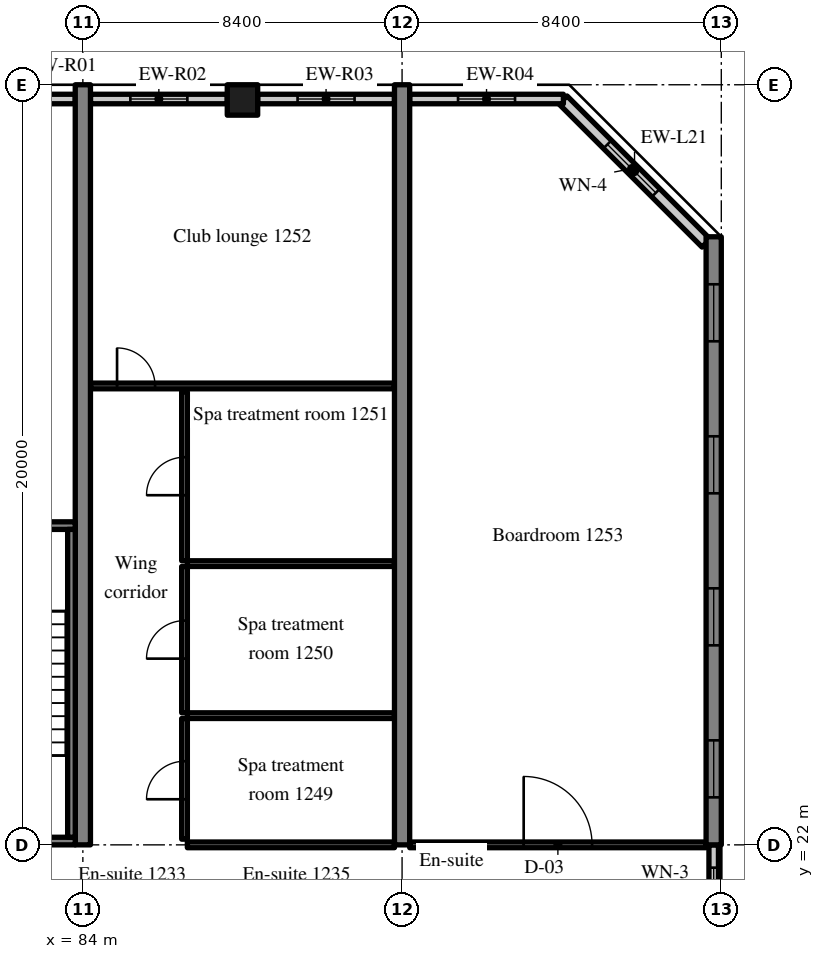
"""IFC4 building model, lengths in metres.
Left out: names, types, materials, properties, quantities, classifications, styles, units other than length and angle.
Written with IfcOpenShell. Run it as: python <this file> out.ifc"""

import sys

from ifc_helpers import new_model, si_unit, direction, frame, frame_2d, origin, origin_2d, place, context, subcontext, project, spatial, rectangle, extrude, source, transform, mapped, element, fill, save


model = new_model("IFC4")
c1 = context("Model", 3, precision=1e-05, world=origin(), true_north=direction((0.0, 1.0)))
c2 = subcontext(c1, "Body", "Model", "MODEL_VIEW")
j1 = project(units=[si_unit("LENGTHUNIT", "METRE"), si_unit("PLANEANGLEUNIT", "RADIAN")], contexts=[c1])
p1 = place(None, origin())
s1 = spatial("IfcSite", under=j1, at=p1, CompositionType="ELEMENT")
p2 = place(p1, origin())
s2 = spatial("IfcBuilding", under=s1, at=p2, CompositionType="ELEMENT")
p3 = place(p2, frame((0.0, 0.0, 54.4)))
s3 = spatial("IfcBuildingStorey", under=s2, at=p3, CompositionType="ELEMENT", Elevation=54.4)
m1 = source(origin(), c2, "Body", "SweptSolid", [
    extrude(rectangle(XDim=20.0, YDim=0.4, at=frame_2d((10.0, 0.0))), origin(), (0.0, 0.0, 1.0), 3.52),
])
for number, where, z_axis, x_axis in (
    (1, (84.0, 22.0, 0.0), (0.0, 0.0, 1.0), (0.0, 1.0, 0.0)),
    (2, (92.4, 22.0, 0.0), (0.0, 0.0, 1.0), (0.0, 1.0, 0.0)),
):
    element("IfcWall", number, at=place(p3, frame(where, z_axis=z_axis, x_axis=x_axis)), inside=s3, PredefinedType="SHEAR", context=c2, shape_type="MappedRepresentation", body=[
        mapped(m1, transform((0.0, 0.0, 0.0), scale=1.0)),
    ])
m2 = source(origin(), c2, "Body", "SweptSolid", [
    extrude(rectangle(XDim=16.0, YDim=0.4, at=frame_2d((8.0, 0.0))), origin(), (0.0, 0.0, 1.0), 3.52),
])
p4 = place(p3, frame((100.6, 22.0, 0.0), z_axis=(0.0, 0.0, 1.0), x_axis=(0.0, 1.0, 0.0)))
e3 = element("IfcWall", 3, at=p4, inside=s3, PredefinedType="SHEAR", context=c2, shape_type="MappedRepresentation", body=[
    mapped(m2, transform((0.0, 0.0, 0.0), scale=1.0)),
])
m3 = source(origin(), c2, "Body", "SweptSolid", [
    extrude(rectangle(XDim=1.5, YDim=1.5, at=frame_2d((0.75, 0.75))), frame((0.0, 0.21, 0.0), z_axis=(0.0, -1.0, 0.0), x_axis=(1.0, 0.0, 0.0)), (0.0, 0.0, 1.0), 0.42),
])
p5 = place(p4, frame((1.25, 0.0, 0.9)))
e4 = element("IfcOpeningElement", 4, at=p5, cuts=e3, PredefinedType="OPENING", context=c2, shape_type="MappedRepresentation", body=[
    mapped(m3, transform((0.0, 0.0, 0.0), scale=1.0)),
])
p6 = place(p4, frame((5.25, 0.0, 0.9)))
e5 = element("IfcOpeningElement", 5, at=p6, cuts=e3, PredefinedType="OPENING", context=c2, shape_type="MappedRepresentation", body=[
    mapped(m3, transform((0.0, 0.0, 0.0), scale=1.0)),
])
p7 = place(p4, frame((9.25, 0.0, 0.9)))
e6 = element("IfcOpeningElement", 6, at=p7, cuts=e3, PredefinedType="OPENING", context=c2, shape_type="MappedRepresentation", body=[
    mapped(m3, transform((0.0, 0.0, 0.0), scale=1.0)),
])
p8 = place(p4, frame((13.25, 0.0, 0.9)))
e7 = element("IfcOpeningElement", 7, at=p8, cuts=e3, PredefinedType="OPENING", context=c2, shape_type="MappedRepresentation", body=[
    mapped(m3, transform((0.0, 0.0, 0.0), scale=1.0)),
])
m4 = source(origin(), c2, "Body", "SweptSolid", [
    extrude(rectangle(XDim=0.8, YDim=0.8, at=origin_2d()), origin(), (0.0, 0.0, 1.0), 3.52),
])
p9 = place(p3, frame((88.2, 41.6, 0.0), z_axis=(0.0, 0.0, 1.0), x_axis=(1.0, 0.0, 0.0)))
e8 = element("IfcColumn", 8, at=p9, inside=s3, PredefinedType="COLUMN", context=c2, shape_type="MappedRepresentation", body=[
    mapped(m4, transform((0.0, 0.0, 0.0), scale=1.0)),
])
m5 = source(origin(), c2, "Body", "SweptSolid", [
    extrude(rectangle(XDim=5.326, YDim=0.3, at=frame_2d((2.663, 0.0))), origin(), (0.0, 0.0, 1.0), 3.52),
])
p10 = place(p3, frame((100.4, 37.834, 0.0), z_axis=(0.0, 0.0, 1.0), x_axis=(-0.707083859269, 0.707129702361, 0.0)))
e9 = element("IfcWall", 9, at=p10, inside=s3, PredefinedType="SOLIDWALL", context=c2, shape_type="MappedRepresentation", body=[
    mapped(m5, transform((0.0, 0.0, 0.0), scale=1.0)),
])
m6 = source(origin(), c2, "Body", "SweptSolid", [
    extrude(rectangle(XDim=1.8, YDim=1.5, at=frame_2d((0.9, 0.75))), frame((0.0, 0.16, 0.0), z_axis=(0.0, -1.0, 0.0), x_axis=(1.0, 0.0, 0.0)), (0.0, 0.0, 1.0), 0.32),
])
p11 = place(p10, frame((1.871, 0.0, 0.9)))
e10 = element("IfcOpeningElement", 10, at=p11, cuts=e9, PredefinedType="OPENING", context=c2, shape_type="MappedRepresentation", body=[
    mapped(m6, transform((0.0, 0.0, 0.0), scale=1.0)),
])
m7 = source(origin(), c2, "Body", "SweptSolid", [
    extrude(rectangle(XDim=1.658, YDim=0.25, at=frame_2d((0.829, 0.0))), origin(), (0.0, 0.0, 1.0), 2.82),
])
p12 = place(p3, frame((83.8, 41.625, 0.0), z_axis=(0.0, 0.0, 1.0), x_axis=(-1.0, 0.0, 0.0)))
e11 = element("IfcWall", 11, at=p12, inside=s3, PredefinedType="SOLIDWALL", context=c2, shape_type="MappedRepresentation", body=[
    mapped(m7, transform((0.0, 0.0, 0.0), scale=1.0)),
])
m8 = source(origin(), c2, "Body", "SweptSolid", [
    extrude(rectangle(XDim=3.6, YDim=0.25, at=frame_2d((1.8, 0.0))), origin(), (0.0, 0.0, 1.0), 2.82),
])
p13 = place(p3, frame((87.8, 41.625, 0.0), z_axis=(0.0, 0.0, 1.0), x_axis=(-1.0, 0.0, 0.0)))
e12 = element("IfcWall", 12, at=p13, inside=s3, PredefinedType="SOLIDWALL", context=c2, shape_type="MappedRepresentation", body=[
    mapped(m8, transform((0.0, 0.0, 0.0), scale=1.0)),
])
m9 = source(origin(), c2, "Body", "SweptSolid", [
    extrude(rectangle(XDim=1.5, YDim=1.5, at=frame_2d((0.75, 0.75))), frame((0.0, 0.135, 0.0), z_axis=(0.0, -1.0, 0.0), x_axis=(1.0, 0.0, 0.0)), (0.0, 0.0, 1.0), 0.27),
])
p14 = place(p13, frame((1.05, 0.0, 0.9)))
e13 = element("IfcOpeningElement", 13, at=p14, cuts=e12, PredefinedType="OPENING", context=c2, shape_type="MappedRepresentation", body=[
    mapped(m9, transform((0.0, 0.0, 0.0), scale=1.0)),
])
m10 = source(origin(), c2, "Body", "SweptSolid", [
    extrude(rectangle(XDim=3.6, YDim=0.25, at=frame_2d((1.8, 0.0))), origin(), (0.0, 0.0, 1.0), 2.82),
])
p15 = place(p3, frame((92.2, 41.625, 0.0), z_axis=(0.0, 0.0, 1.0), x_axis=(-1.0, 0.0, 0.0)))
e14 = element("IfcWall", 14, at=p15, inside=s3, PredefinedType="SOLIDWALL", context=c2, shape_type="MappedRepresentation", body=[
    mapped(m10, transform((0.0, 0.0, 0.0), scale=1.0)),
])
p16 = place(p15, frame((1.05, 0.0, 0.9)))
e15 = element("IfcOpeningElement", 15, at=p16, cuts=e14, PredefinedType="OPENING", context=c2, shape_type="MappedRepresentation", body=[
    mapped(m9, transform((0.0, 0.0, 0.0), scale=1.0)),
])
m11 = source(origin(), c2, "Body", "SweptSolid", [
    extrude(rectangle(XDim=4.045, YDim=0.25, at=frame_2d((2.022, 0.0))), origin(), (0.0, 0.0, 1.0), 2.82),
])
p17 = place(p3, frame((96.645, 41.625, 0.0), z_axis=(0.0, 0.0, 1.0), x_axis=(-1.0, 0.0, 0.0)))
e16 = element("IfcWall", 16, at=p17, inside=s3, PredefinedType="SOLIDWALL", context=c2, shape_type="MappedRepresentation", body=[
    mapped(m11, transform((0.0, 0.0, 0.0), scale=1.0)),
])
p18 = place(p17, frame((1.272, 0.0, 0.9)))
e17 = element("IfcOpeningElement", 17, at=p18, cuts=e16, PredefinedType="OPENING", context=c2, shape_type="MappedRepresentation", body=[
    mapped(m9, transform((0.0, 0.0, 0.0), scale=1.0)),
])
m12 = source(origin(), c2, "Body", "SweptSolid", [
    extrude(rectangle(XDim=2.4, YDim=0.25, at=frame_2d((1.2, 0.0))), origin(), (0.0, 0.0, 1.0), 2.62),
])
p19 = place(p3, frame((100.6, 19.6, 0.0), z_axis=(0.0, 0.0, 1.0), x_axis=(0.0, 1.0, 0.0)))
e18 = element("IfcWall", 18, at=p19, inside=s3, PredefinedType="SOLIDWALL", context=c2, shape_type="MappedRepresentation", body=[
    mapped(m12, transform((0.0, 0.0, 0.0), scale=1.0)),
])
m13 = source(origin(), c2, "Body", "SweptSolid", [
    extrude(rectangle(XDim=1.2, YDim=1.5, at=frame_2d((0.6, 0.75))), frame((0.0, 0.135, 0.0), z_axis=(0.0, -1.0, 0.0), x_axis=(1.0, 0.0, 0.0)), (0.0, 0.0, 1.0), 0.27),
])
p20 = place(p19, frame((0.6, 0.0, 0.9)))
e19 = element("IfcOpeningElement", 19, at=p20, cuts=e18, PredefinedType="OPENING", context=c2, shape_type="MappedRepresentation", body=[
    mapped(m13, transform((0.0, 0.0, 0.0), scale=1.0)),
])
m14 = source(origin(), c2, "Body", "SweptSolid", [
    extrude(rectangle(XDim=8.2, YDim=0.2, at=frame_2d((4.1, 0.0))), origin(), (0.0, 0.0, 1.0), 3.52),
])
p21 = place(p3, frame((83.8, 22.1, 0.0), z_axis=(0.0, 0.0, 1.0), x_axis=(-1.0, 0.0, 0.0)))
e20 = element("IfcWall", 20, at=p21, inside=s3, PredefinedType="SOLIDWALL", context=c2, shape_type="MappedRepresentation", body=[
    mapped(m14, transform((0.0, 0.0, 0.0), scale=1.0)),
])
m15 = source(origin(), c2, "Body", "SweptSolid", [
    extrude(rectangle(XDim=1.2, YDim=2.1, at=frame_2d((0.6, 1.05))), frame((0.0, 0.11, 0.0), z_axis=(0.0, -1.0, 0.0), x_axis=(1.0, 0.0, 0.0)), (0.0, 0.0, 1.0), 0.22),
])
p22 = place(p21, frame((6.0, 0.0, 0.0)))
e21 = element("IfcOpeningElement", 21, at=p22, cuts=e20, PredefinedType="OPENING", context=c2, shape_type="MappedRepresentation", body=[
    mapped(m15, transform((0.0, 0.0, 0.0), scale=1.0)),
])
p23 = place(p3, frame((83.8, 30.4, 0.0), z_axis=(0.0, 0.0, 1.0), x_axis=(-1.0, 0.0, 0.0)))
e22 = element("IfcWall", 22, at=p23, inside=s3, PredefinedType="SOLIDWALL", context=c2, shape_type="MappedRepresentation", body=[
    mapped(m14, transform((0.0, 0.0, 0.0), scale=1.0)),
])
m16 = source(origin(), c2, "Body", "SweptSolid", [
    extrude(rectangle(XDim=1.0, YDim=2.1, at=frame_2d((0.5, 1.05))), frame((0.0, 0.11, 0.0), z_axis=(0.0, -1.0, 0.0), x_axis=(1.0, 0.0, 0.0)), (0.0, 0.0, 1.0), 0.22),
])
p24 = place(p23, frame((6.1, 0.0, 0.0)))
e23 = element("IfcOpeningElement", 23, at=p24, cuts=e22, PredefinedType="OPENING", context=c2, shape_type="MappedRepresentation", body=[
    mapped(m16, transform((0.0, 0.0, 0.0), scale=1.0)),
])
m17 = source(origin(), c2, "Body", "SweptSolid", [
    extrude(rectangle(XDim=8.1, YDim=0.2, at=frame_2d((4.05, 0.0))), origin(), (0.0, 0.0, 1.0), 3.52),
])
p25 = place(p3, frame((83.7, 22.2, 0.0), z_axis=(0.0, 0.0, 1.0), x_axis=(0.0, 1.0, 0.0)))
e24 = element("IfcWall", 24, at=p25, inside=s3, PredefinedType="SOLIDWALL", context=c2, shape_type="MappedRepresentation", body=[
    mapped(m17, transform((0.0, 0.0, 0.0), scale=1.0)),
])
m18 = source(origin(), c2, "Body", "SweptSolid", [
    extrude(rectangle(XDim=5.45, YDim=0.15, at=frame_2d((2.725, 0.0))), origin(), (0.0, 0.0, 1.0), 2.82),
])
p26 = place(p3, frame((86.75, 22.0, 0.0), z_axis=(0.0, 0.0, 1.0), x_axis=(1.0, 0.0, 0.0)))
e25 = element("IfcWall", 25, at=p26, inside=s3, PredefinedType="PARTITIONING", context=c2, shape_type="MappedRepresentation", body=[
    mapped(m18, transform((0.0, 0.0, 0.0), scale=1.0)),
])
m19 = source(origin(), c2, "Body", "SweptSolid", [
    extrude(rectangle(XDim=3.175, YDim=0.15, at=frame_2d((1.587, 0.0))), origin(), (0.0, 0.0, 1.0), 3.52),
])
p27 = place(p3, frame((86.675, 22.15, 0.0), z_axis=(0.0, 0.0, 1.0), x_axis=(0.0, 1.0, 0.0)))
e26 = element("IfcWall", 26, at=p27, inside=s3, PredefinedType="PARTITIONING", context=c2, shape_type="MappedRepresentation", body=[
    mapped(m19, transform((0.0, 0.0, 0.0), scale=1.0)),
])
m20 = source(origin(), c2, "Body", "SweptSolid", [
    extrude(rectangle(XDim=1.0, YDim=2.1, at=frame_2d((0.5, 1.05))), frame((0.0, 0.085, 0.0), z_axis=(0.0, -1.0, 0.0), x_axis=(1.0, 0.0, 0.0)), (0.0, 0.0, 1.0), 0.17),
])
p28 = place(p27, frame((1.05, 0.0, 0.0)))
e27 = element("IfcOpeningElement", 27, at=p28, cuts=e26, PredefinedType="OPENING", context=c2, shape_type="MappedRepresentation", body=[
    mapped(m20, transform((0.0, 0.0, 0.0), scale=1.0)),
])
m21 = source(origin(), c2, "Body", "SweptSolid", [
    extrude(rectangle(XDim=5.45, YDim=0.15, at=frame_2d((2.725, 0.0))), origin(), (0.0, 0.0, 1.0), 3.52),
])
p29 = place(p3, frame((86.75, 25.4, 0.0), z_axis=(0.0, 0.0, 1.0), x_axis=(1.0, 0.0, 0.0)))
e28 = element("IfcWall", 28, at=p29, inside=s3, PredefinedType="PARTITIONING", context=c2, shape_type="MappedRepresentation", body=[
    mapped(m21, transform((0.0, 0.0, 0.0), scale=1.0)),
])
m22 = source(origin(), c2, "Body", "SweptSolid", [
    extrude(rectangle(XDim=3.85, YDim=0.15, at=frame_2d((1.925, 0.0))), origin(), (0.0, 0.0, 1.0), 3.52),
])
p30 = place(p3, frame((86.675, 25.475, 0.0), z_axis=(0.0, 0.0, 1.0), x_axis=(0.0, 1.0, 0.0)))
e29 = element("IfcWall", 29, at=p30, inside=s3, PredefinedType="PARTITIONING", context=c2, shape_type="MappedRepresentation", body=[
    mapped(m22, transform((0.0, 0.0, 0.0), scale=1.0)),
])
p31 = place(p30, frame((1.425, 0.0, 0.0)))
e30 = element("IfcOpeningElement", 30, at=p31, cuts=e29, PredefinedType="OPENING", context=c2, shape_type="MappedRepresentation", body=[
    mapped(m20, transform((0.0, 0.0, 0.0), scale=1.0)),
])
p32 = place(p3, frame((86.75, 29.4, 0.0), z_axis=(0.0, 0.0, 1.0), x_axis=(1.0, 0.0, 0.0)))
e31 = element("IfcWall", 31, at=p32, inside=s3, PredefinedType="PARTITIONING", context=c2, shape_type="MappedRepresentation", body=[
    mapped(m21, transform((0.0, 0.0, 0.0), scale=1.0)),
])
m23 = source(origin(), c2, "Body", "SweptSolid", [
    extrude(rectangle(XDim=4.45, YDim=0.15, at=frame_2d((2.225, 0.0))), origin(), (0.0, 0.0, 1.0), 3.52),
])
p33 = place(p3, frame((86.675, 29.475, 0.0), z_axis=(0.0, 0.0, 1.0), x_axis=(0.0, 1.0, 0.0)))
e32 = element("IfcWall", 32, at=p33, inside=s3, PredefinedType="PARTITIONING", context=c2, shape_type="MappedRepresentation", body=[
    mapped(m23, transform((0.0, 0.0, 0.0), scale=1.0)),
])
p34 = place(p33, frame((1.725, 0.0, 0.0)))
e33 = element("IfcOpeningElement", 33, at=p34, cuts=e32, PredefinedType="OPENING", context=c2, shape_type="MappedRepresentation", body=[
    mapped(m20, transform((0.0, 0.0, 0.0), scale=1.0)),
])
m24 = source(origin(), c2, "Body", "SweptSolid", [
    extrude(rectangle(XDim=8.0, YDim=0.15, at=frame_2d((4.0, 0.0))), origin(), (0.0, 0.0, 1.0), 3.52),
])
p35 = place(p3, frame((84.2, 34.075, 0.0), z_axis=(0.0, 0.0, 1.0), x_axis=(1.0, 0.0, 0.0)))
e34 = element("IfcWall", 34, at=p35, inside=s3, PredefinedType="PARTITIONING", context=c2, shape_type="MappedRepresentation", body=[
    mapped(m24, transform((0.0, 0.0, 0.0), scale=1.0)),
])
p36 = place(p35, frame((0.7, 0.0, 0.0)))
e35 = element("IfcOpeningElement", 35, at=p36, cuts=e34, PredefinedType="OPENING", context=c2, shape_type="MappedRepresentation", body=[
    mapped(m20, transform((0.0, 0.0, 0.0), scale=1.0)),
])
m25 = source(origin(), c2, "Body", "SweptSolid", [
    extrude(rectangle(XDim=7.8, YDim=0.15, at=frame_2d((3.9, 0.0))), origin(), (0.0, 0.0, 1.0), 2.82),
])
p37 = place(p3, frame((92.6, 22.0, 0.0), z_axis=(0.0, 0.0, 1.0), x_axis=(1.0, 0.0, 0.0)))
e36 = element("IfcWall", 36, at=p37, inside=s3, PredefinedType="PARTITIONING", context=c2, shape_type="MappedRepresentation", body=[
    mapped(m25, transform((0.0, 0.0, 0.0), scale=1.0)),
])
m26 = source(origin(), c2, "Body", "SweptSolid", [
    extrude(rectangle(XDim=1.8, YDim=2.1, at=frame_2d((0.9, 1.05))), frame((0.0, 0.085, 0.0), z_axis=(0.0, -1.0, 0.0), x_axis=(1.0, 0.0, 0.0)), (0.0, 0.0, 1.0), 0.17),
])
p38 = place(p37, frame((3.0, 0.0, 0.0)))
e37 = element("IfcOpeningElement", 37, at=p38, cuts=e36, PredefinedType="OPENING", context=c2, shape_type="MappedRepresentation", body=[
    mapped(m26, transform((0.0, 0.0, 0.0), scale=1.0)),
])
m27 = source(origin(), c2, "Body", "SweptSolid", [
    extrude(rectangle(XDim=1.8, YDim=1.5, at=frame_2d((0.9, 0.75))), frame((0.0, 0.03, 0.0), z_axis=(0.0, -1.0, 0.0), x_axis=(1.0, 0.0, 0.0)), (0.0, 0.0, 1.0), 0.06),
])
p39 = place(p11, origin())
e38 = element("IfcWindow", 38, at=p39, inside=s3, PartitioningType="SINGLE_PANEL", PredefinedType="WINDOW", context=c2, shape_type="MappedRepresentation", body=[
    mapped(m27, transform((0.0, 0.0, 0.0), scale=1.0)),
])
fill(e10, e38)
m28 = source(origin(), c2, "Body", "SweptSolid", [
    extrude(rectangle(XDim=1.5, YDim=1.5, at=frame_2d((0.75, 0.75))), frame((0.0, 0.03, 0.0), z_axis=(0.0, -1.0, 0.0), x_axis=(1.0, 0.0, 0.0)), (0.0, 0.0, 1.0), 0.06),
])
p40 = place(p14, origin())
e39 = element("IfcWindow", 39, at=p40, inside=s3, PartitioningType="SINGLE_PANEL", PredefinedType="WINDOW", context=c2, shape_type="MappedRepresentation", body=[
    mapped(m28, transform((0.0, 0.0, 0.0), scale=1.0)),
])
fill(e13, e39)
p41 = place(p16, origin())
e40 = element("IfcWindow", 40, at=p41, inside=s3, PartitioningType="SINGLE_PANEL", PredefinedType="WINDOW", context=c2, shape_type="MappedRepresentation", body=[
    mapped(m28, transform((0.0, 0.0, 0.0), scale=1.0)),
])
fill(e15, e40)
p42 = place(p18, origin())
e41 = element("IfcWindow", 41, at=p42, inside=s3, PartitioningType="SINGLE_PANEL", PredefinedType="WINDOW", context=c2, shape_type="MappedRepresentation", body=[
    mapped(m28, transform((0.0, 0.0, 0.0), scale=1.0)),
])
fill(e17, e41)
p43 = place(p5, origin())
e42 = element("IfcWindow", 42, at=p43, inside=s3, PartitioningType="SINGLE_PANEL", PredefinedType="WINDOW", context=c2, shape_type="MappedRepresentation", body=[
    mapped(m28, transform((0.0, 0.0, 0.0), scale=1.0)),
])
fill(e4, e42)
p44 = place(p6, origin())
e43 = element("IfcWindow", 43, at=p44, inside=s3, PartitioningType="SINGLE_PANEL", PredefinedType="WINDOW", context=c2, shape_type="MappedRepresentation", body=[
    mapped(m28, transform((0.0, 0.0, 0.0), scale=1.0)),
])
fill(e5, e43)
p45 = place(p7, origin())
e44 = element("IfcWindow", 44, at=p45, inside=s3, PartitioningType="SINGLE_PANEL", PredefinedType="WINDOW", context=c2, shape_type="MappedRepresentation", body=[
    mapped(m28, transform((0.0, 0.0, 0.0), scale=1.0)),
])
fill(e6, e44)
p46 = place(p8, origin())
e45 = element("IfcWindow", 45, at=p46, inside=s3, PartitioningType="SINGLE_PANEL", PredefinedType="WINDOW", context=c2, shape_type="MappedRepresentation", body=[
    mapped(m28, transform((0.0, 0.0, 0.0), scale=1.0)),
])
fill(e7, e45)
m29 = source(origin(), c2, "Body", "SweptSolid", [
    extrude(rectangle(XDim=1.2, YDim=1.5, at=frame_2d((0.6, 0.75))), frame((0.0, 0.03, 0.0), z_axis=(0.0, -1.0, 0.0), x_axis=(1.0, 0.0, 0.0)), (0.0, 0.0, 1.0), 0.06),
])
p47 = place(p20, origin())
e46 = element("IfcWindow", 46, at=p47, inside=s3, PartitioningType="SINGLE_PANEL", PredefinedType="WINDOW", context=c2, shape_type="MappedRepresentation", body=[
    mapped(m29, transform((0.0, 0.0, 0.0), scale=1.0)),
])
fill(e19, e46)
m30 = source(origin(), c2, "Body", "SweptSolid", [
    extrude(rectangle(XDim=1.0, YDim=2.1, at=frame_2d((0.5, 1.05))), frame((0.0, 0.025, 0.0), z_axis=(0.0, -1.0, 0.0), x_axis=(1.0, 0.0, 0.0)), (0.0, 0.0, 1.0), 0.05),
])
p48 = place(p28, origin())
e47 = element("IfcDoor", 47, at=p48, inside=s3, OperationType="SINGLE_SWING_LEFT", PredefinedType="DOOR", context=c2, shape_type="MappedRepresentation", body=[
    mapped(m30, transform((0.0, 0.0, 0.0), scale=1.0)),
])
fill(e27, e47)
p49 = place(p31, origin())
e48 = element("IfcDoor", 48, at=p49, inside=s3, OperationType="SINGLE_SWING_LEFT", PredefinedType="DOOR", context=c2, shape_type="MappedRepresentation", body=[
    mapped(m30, transform((0.0, 0.0, 0.0), scale=1.0)),
])
fill(e30, e48)
p50 = place(p34, origin())
e49 = element("IfcDoor", 49, at=p50, inside=s3, OperationType="SINGLE_SWING_LEFT", PredefinedType="DOOR", context=c2, shape_type="MappedRepresentation", body=[
    mapped(m30, transform((0.0, 0.0, 0.0), scale=1.0)),
])
fill(e33, e49)
p51 = place(p36, origin())
e50 = element("IfcDoor", 50, at=p51, inside=s3, OperationType="SINGLE_SWING_LEFT", PredefinedType="DOOR", context=c2, shape_type="MappedRepresentation", body=[
    mapped(m30, transform((0.0, 0.0, 0.0), scale=1.0)),
])
fill(e35, e50)
m31 = source(origin(), c2, "Body", "SweptSolid", [
    extrude(rectangle(XDim=1.8, YDim=2.1, at=frame_2d((0.9, 1.05))), frame((0.0, 0.025, 0.0), z_axis=(0.0, -1.0, 0.0), x_axis=(1.0, 0.0, 0.0)), (0.0, 0.0, 1.0), 0.05),
])
p52 = place(p38, origin())
e51 = element("IfcDoor", 51, at=p52, inside=s3, OperationType="DOUBLE_DOOR_SINGLE_SWING", PredefinedType="DOOR", context=c2, shape_type="MappedRepresentation", body=[
    mapped(m31, transform((0.0, 0.0, 0.0), scale=1.0)),
])
fill(e37, e51)
save(model, sys.argv[1])
